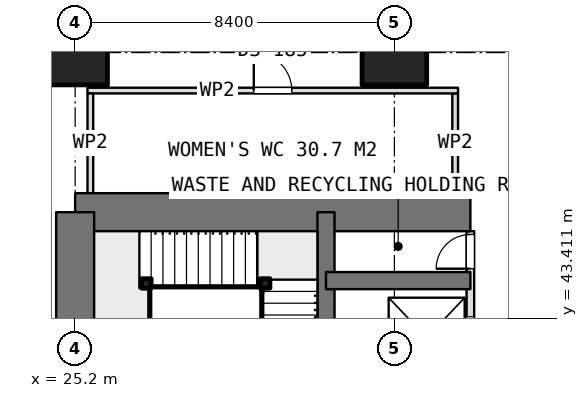
"""IFC4 building model, lengths in metres.
Left out: names, types, materials, properties, quantities, classifications, styles, units other than length and angle.
Written with IfcOpenShell. Run it as: python <this file> out.ifc"""

import sys

from ifc_helpers import new_model, si_unit, direction, frame, frame_2d, origin, origin_2d, place, context, subcontext, project, spatial, rectangle, extrude, element, fill, save


model = new_model("IFC4")
c1 = context("Model", 3, precision=1e-05, world=origin(), true_north=direction((0.0, 1.0)))
c2 = subcontext(c1, "Body", "Model", "MODEL_VIEW")
j1 = project(units=[si_unit("LENGTHUNIT", "METRE"), si_unit("PLANEANGLEUNIT", "RADIAN")], contexts=[c1])
p1 = place(None, origin())
s1 = spatial("IfcSite", under=j1, at=p1, CompositionType="ELEMENT")
p2 = place(p1, origin())
s2 = spatial("IfcBuilding", under=s1, at=p2, CompositionType="ELEMENT")
p3 = place(p2, frame((0.0, 0.0, 176.45)))
s3 = spatial("IfcBuildingStorey", under=s2, at=p3, CompositionType="ELEMENT", Elevation=176.45)
p4 = place(p3, frame((25.2, 46.2, 0.0), z_axis=(0.0, 0.0, 1.0), x_axis=(1.0, 0.0, 0.0)))
e1 = element("IfcWall", 1, at=p4, inside=s3, PredefinedType="SHEAR", context=c2, shape_type="SweptSolid", body=[
    extrude(rectangle(XDim=10.4, YDim=1.0, at=frame_2d((5.2, 0.0))), origin(), (0.0, 0.0, 1.0), 3.75),
])
p5 = place(p3, frame((25.2, 21.0, 0.0), z_axis=(0.0, 0.0, 1.0), x_axis=(0.0, 1.0, 0.0)))
e2 = element("IfcWall", 2, at=p5, inside=s3, PredefinedType="SHEAR", context=c2, shape_type="SweptSolid", body=[
    extrude(rectangle(XDim=25.2, YDim=1.0, at=frame_2d((12.6, 0.0))), origin(), (0.0, 0.0, 1.0), 3.75),
])
p6 = place(p5, frame((7.8, 0.0, 0.0)))
e3 = element("IfcOpeningElement", 3, at=p6, cuts=e2, PredefinedType="OPENING", context=c2, shape_type="SweptSolid", body=[
    extrude(rectangle(XDim=1.2, YDim=2.1, at=frame_2d((0.6, 1.05))), frame((0.0, 0.51, 0.0), z_axis=(0.0, -1.0, 0.0), x_axis=(1.0, 0.0, 0.0)), (0.0, 0.0, 1.0), 1.02),
])
p7 = place(p5, frame((14.25, 0.0, 0.0)))
e4 = element("IfcOpeningElement", 4, at=p7, cuts=e2, PredefinedType="OPENING", context=c2, shape_type="SweptSolid", body=[
    extrude(rectangle(XDim=0.9, YDim=2.1, at=frame_2d((0.45, 1.05))), frame((0.0, 0.51, 0.0), z_axis=(0.0, -1.0, 0.0), x_axis=(1.0, 0.0, 0.0)), (0.0, 0.0, 1.0), 1.02),
])
p8 = place(p5, frame((16.85, 0.0, 0.0)))
e5 = element("IfcOpeningElement", 5, at=p8, cuts=e2, PredefinedType="OPENING", context=c2, shape_type="SweptSolid", body=[
    extrude(rectangle(XDim=0.9, YDim=2.1, at=frame_2d((0.45, 1.05))), frame((0.0, 0.51, 0.0), z_axis=(0.0, -1.0, 0.0), x_axis=(1.0, 0.0, 0.0)), (0.0, 0.0, 1.0), 1.02),
])
p9 = place(p5, frame((19.025, 0.0, 0.0)))
e6 = element("IfcOpeningElement", 6, at=p9, cuts=e2, PredefinedType="OPENING", context=c2, shape_type="SweptSolid", body=[
    extrude(rectangle(XDim=1.2, YDim=2.1, at=frame_2d((0.6, 1.05))), frame((0.0, 0.51, 0.0), z_axis=(0.0, -1.0, 0.0), x_axis=(1.0, 0.0, 0.0)), (0.0, 0.0, 1.0), 1.02),
])
p10 = place(p3, frame((31.8, 21.0, 0.0), z_axis=(0.0, 0.0, 1.0), x_axis=(0.0, 1.0, 0.0)))
e7 = element("IfcWall", 7, at=p10, inside=s3, PredefinedType="SHEAR", context=c2, shape_type="SweptSolid", body=[
    extrude(rectangle(XDim=25.2, YDim=0.45, at=frame_2d((12.6, 0.0))), origin(), (0.0, 0.0, 1.0), 3.75),
])
p11 = place(p3, frame((31.8, 44.4, 0.0), z_axis=(0.0, 0.0, 1.0), x_axis=(1.0, 0.0, 0.0)))
e8 = element("IfcWall", 8, at=p11, inside=s3, PredefinedType="SHEAR", context=c2, shape_type="SweptSolid", body=[
    extrude(rectangle(XDim=3.8, YDim=0.45, at=frame_2d((1.9, 0.0))), origin(), (0.0, 0.0, 1.0), 3.75),
])
for number, where, z_axis, x_axis in (
    (9, (25.2, 50.4, 0.0), (0.0, 0.0, 1.0), (1.0, 0.0, 0.0)),
    (10, (33.6, 50.4, 0.0), (0.0, 0.0, 1.0), (1.0, 0.0, 0.0)),
):
    element("IfcColumn", number, at=place(p3, frame(where, z_axis=z_axis, x_axis=x_axis)), inside=s3, PredefinedType="COLUMN", context=c2, shape_type="SweptSolid", body=[
        extrude(rectangle(XDim=1.7, YDim=1.7, at=origin_2d()), origin(), (0.0, 0.0, 1.0), 3.75),
    ])
p12 = place(p3, frame((35.6, 41.625, 0.0), z_axis=(0.0, 0.0, 1.0), x_axis=(0.0, 1.0, 0.0)))
e11 = element("IfcWall", 11, at=p12, inside=s3, PredefinedType="PARTITIONING", context=c2, shape_type="SweptSolid", body=[
    extrude(rectangle(XDim=4.075, YDim=0.2, at=frame_2d((2.038, 0.0))), origin(), (0.0, 0.0, 1.0), 3.5),
])
p13 = place(p12, frame((3.088, 0.0, 0.0)))
e12 = element("IfcOpeningElement", 12, at=p13, cuts=e11, PredefinedType="OPENING", context=c2, shape_type="SweptSolid", body=[
    extrude(rectangle(XDim=0.9, YDim=2.1, at=frame_2d((0.45, 1.05))), frame((0.0, 0.11, 0.0), z_axis=(0.0, -1.0, 0.0), x_axis=(1.0, 0.0, 0.0)), (0.0, 0.0, 1.0), 0.22),
])
p14 = place(p12, frame((0.725, 0.0, 0.0)))
e13 = element("IfcOpeningElement", 13, at=p14, cuts=e11, PredefinedType="OPENING", context=c2, shape_type="SweptSolid", body=[
    extrude(rectangle(XDim=1.1, YDim=2.1, at=frame_2d((0.55, 1.05))), frame((0.0, 0.11, 0.0), z_axis=(0.0, -1.0, 0.0), x_axis=(1.0, 0.0, 0.0)), (0.0, 0.0, 1.0), 0.22),
])
p15 = place(p3, frame((25.525, 49.4, 0.0), z_axis=(0.0, 0.0, 1.0), x_axis=(1.0, 0.0, 0.0)))
e14 = element("IfcWall", 14, at=p15, inside=s3, PredefinedType="PARTITIONING", context=c2, shape_type="SweptSolid", body=[
    extrude(rectangle(XDim=9.75, YDim=0.15, at=frame_2d((4.875, 0.0))), origin(), (0.0, 0.0, 1.0), 3.5),
])
p16 = place(p15, frame((4.375, 0.0, 0.0)))
e15 = element("IfcOpeningElement", 15, at=p16, cuts=e14, PredefinedType="OPENING", context=c2, shape_type="SweptSolid", body=[
    extrude(rectangle(XDim=1.0, YDim=2.1, at=frame_2d((0.5, 1.05))), frame((0.0, 0.085, 0.0), z_axis=(0.0, -1.0, 0.0), x_axis=(1.0, 0.0, 0.0)), (0.0, 0.0, 1.0), 0.17),
])
for number, where, z_axis, x_axis in (
    (16, (25.6, 46.7, 0.0), (0.0, 0.0, 1.0), (0.0, 1.0, 0.0)),
    (17, (35.2, 46.7, 0.0), (0.0, 0.0, 1.0), (0.0, 1.0, 0.0)),
):
    element("IfcWall", number, at=place(p3, frame(where, z_axis=z_axis, x_axis=x_axis)), inside=s3, PredefinedType="PARTITIONING", context=c2, shape_type="SweptSolid", body=[
        extrude(rectangle(XDim=2.625, YDim=0.15, at=frame_2d((1.312, 0.0))), origin(), (0.0, 0.0, 1.0), 3.5),
    ])
for number, where, z_axis, x_axis in (
    (18, (30.2, 44.325, 0.0), (0.0, 0.0, 1.0), (1.0, 0.0, 0.0)),
    (19, (27.075, 44.325, 0.0), (0.0, 0.0, 1.0), (1.0, 0.0, 0.0)),
):
    element("IfcColumn", number, at=place(p3, frame(where, z_axis=z_axis, x_axis=x_axis)), inside=s3, PredefinedType="COLUMN", context=c2, shape_type="SweptSolid", body=[
        extrude(rectangle(XDim=0.25, YDim=0.25, at=origin_2d()), origin(), (0.0, 0.0, 1.0), 3.75),
    ])
p17 = place(p13, origin())
e20 = element("IfcDoor", 20, at=p17, inside=s3, OperationType="SINGLE_SWING_LEFT", PredefinedType="DOOR", context=c2, shape_type="SweptSolid", body=[
    extrude(rectangle(XDim=0.9, YDim=2.1, at=frame_2d((0.45, 1.05))), frame((0.0, 0.025, 0.0), z_axis=(0.0, -1.0, 0.0), x_axis=(1.0, 0.0, 0.0)), (0.0, 0.0, 1.0), 0.05),
])
fill(e12, e20)
p18 = place(p14, origin())
e21 = element("IfcDoor", 21, at=p18, inside=s3, OperationType="SLIDING_TO_LEFT", PredefinedType="USERDEFINED", context=c2, shape_type="SweptSolid", body=[
    extrude(rectangle(XDim=1.1, YDim=2.1, at=frame_2d((0.55, 1.05))), frame((0.0, 0.025, 0.0), z_axis=(0.0, -1.0, 0.0), x_axis=(1.0, 0.0, 0.0)), (0.0, 0.0, 1.0), 0.05),
])
fill(e13, e21)
p19 = place(p16, origin())
e22 = element("IfcDoor", 22, at=p19, inside=s3, OperationType="SINGLE_SWING_LEFT", PredefinedType="DOOR", context=c2, shape_type="SweptSolid", body=[
    extrude(rectangle(XDim=1.0, YDim=2.1, at=frame_2d((0.5, 1.05))), frame((0.0, 0.025, 0.0), z_axis=(0.0, -1.0, 0.0), x_axis=(1.0, 0.0, 0.0)), (0.0, 0.0, 1.0), 0.05),
])
fill(e15, e22)
save(model, sys.argv[1])
